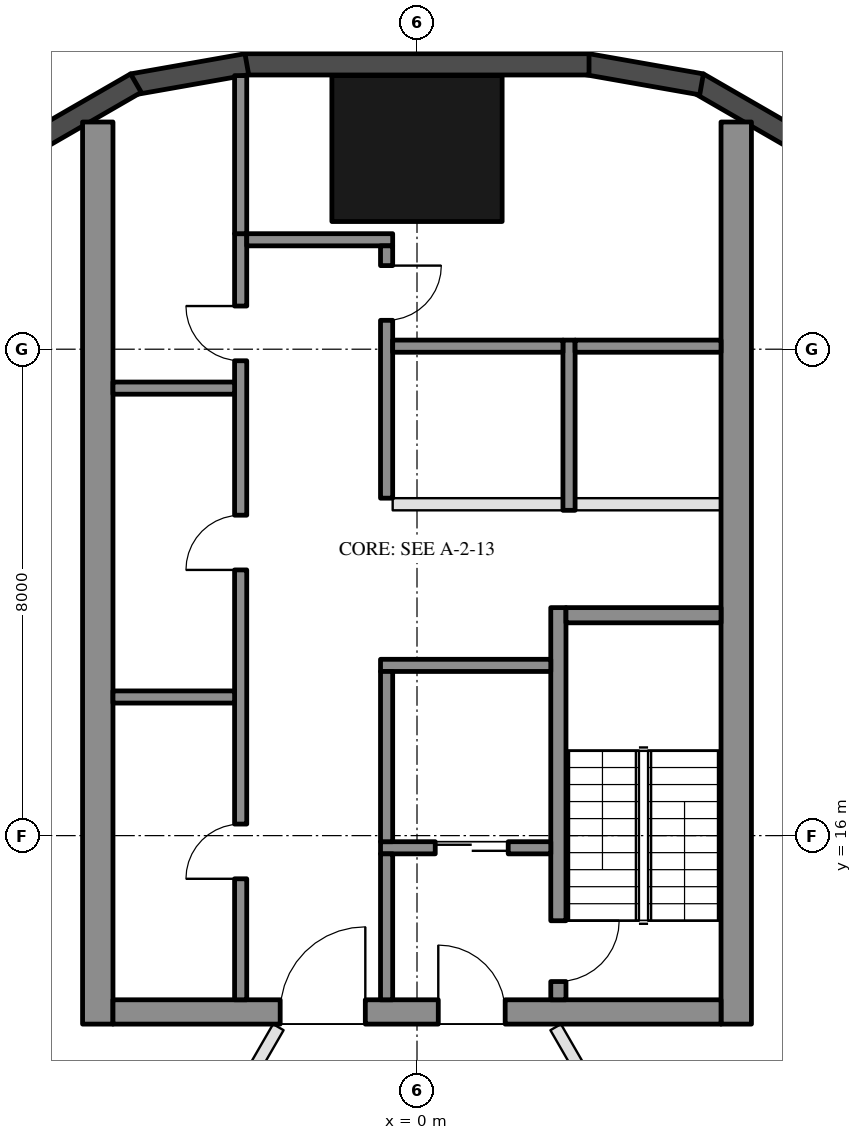
"""IFC4 building model, lengths in metres.
Left out: names, types, materials, properties, quantities, classifications, styles, units other than length and angle.
Written with IfcOpenShell. Run it as: python <this file> out.ifc"""

import sys

from ifc_helpers import new_model, si_unit, direction, frame, frame_2d, origin, origin_2d, place, context, subcontext, project, spatial, rectangle, hollow_rectangle, extrude, element, fill, save


model = new_model("IFC4")
c1 = context("Model", 3, precision=1e-05, world=origin(), true_north=direction((0.0, 1.0)))
c2 = subcontext(c1, "Body", "Model", "MODEL_VIEW")
j1 = project(units=[si_unit("LENGTHUNIT", "METRE"), si_unit("PLANEANGLEUNIT", "RADIAN")], contexts=[c1])
p1 = place(None, origin())
s1 = spatial("IfcSite", under=j1, at=p1, CompositionType="ELEMENT")
p2 = place(p1, origin())
s2 = spatial("IfcBuilding", under=s1, at=p2, CompositionType="ELEMENT")
p3 = place(p2, frame((0.0, 0.0, 61.3)))
s3 = spatial("IfcBuildingStorey", under=s2, at=p3, CompositionType="ELEMENT", Elevation=61.3)
p4 = place(p3, frame((0.0, 27.3, 0.0), z_axis=(0.0, 0.0, 1.0), x_axis=(1.0, 0.0, 0.0)))
e1 = element("IfcColumn", 1, at=p4, inside=s3, PredefinedType="COLUMN", context=c2, shape_type="SweptSolid", body=[
    extrude(hollow_rectangle(XDim=2.8, YDim=2.4, WallThickness=0.07, at=origin_2d()), origin(), (0.0, 0.0, 1.0), 3.7),
])
for number, where, z_axis, x_axis in (
    (2, (6.277, 27.422, 0.0), (0.0, 0.0, 1.0), (-0.866, 0.5, 0.0)),
    (3, (4.68, 28.356, 0.0), (0.0, 0.0, 1.0), (-0.985, 0.174, 0.0)),
):
    element("IfcWall", number, at=place(p3, frame(where, z_axis=z_axis, x_axis=x_axis)), inside=s3, PredefinedType="SOLIDWALL", context=c2, shape_type="SweptSolid", body=[
        extrude(rectangle(XDim=1.91, YDim=0.35, at=frame_2d((0.955, 0.0))), origin(), (0.0, 0.0, 1.0), 3.55),
    ])
p5 = place(p3, frame((2.829, 28.685, 0.0), z_axis=(0.0, 0.0, 1.0), x_axis=(-1.0, 0.0, 0.0)))
e4 = element("IfcWall", 4, at=p5, inside=s3, PredefinedType="SOLIDWALL", context=c2, shape_type="SweptSolid", body=[
    extrude(rectangle(XDim=5.658, YDim=0.35, at=frame_2d((2.829, 0.0))), origin(), (0.0, 0.0, 1.0), 3.55),
])
for number, where, z_axis, x_axis in (
    (5, (-2.799, 28.688, 0.0), (0.0, 0.0, 1.0), (-0.985, -0.174, 0.0)),
    (6, (-4.623, 28.377, 0.0), (0.0, 0.0, 1.0), (-0.866, -0.5, 0.0)),
):
    element("IfcWall", number, at=place(p3, frame(where, z_axis=z_axis, x_axis=x_axis)), inside=s3, PredefinedType="SOLIDWALL", context=c2, shape_type="SweptSolid", body=[
        extrude(rectangle(XDim=1.91, YDim=0.35, at=frame_2d((0.955, 0.0))), origin(), (0.0, 0.0, 1.0), 3.55),
    ])
for number, where, z_axis, x_axis in (
    (7, (5.25, 12.9, 0.0), (0.0, 0.0, 1.0), (0.0, 1.0, 0.0)),
    (8, (-5.25, 12.9, 0.0), (0.0, 0.0, 1.0), (0.0, 1.0, 0.0)),
):
    element("IfcWall", number, at=place(p3, frame(where, z_axis=z_axis, x_axis=x_axis)), inside=s3, PredefinedType="SHEAR", context=c2, shape_type="SweptSolid", body=[
        extrude(rectangle(XDim=14.837, YDim=0.5, at=frame_2d((7.418, 0.0))), origin(), (0.0, 0.0, 1.0), 3.5),
    ])
p6 = place(p3, frame((5.0, 13.1, 0.0), z_axis=(0.0, 0.0, 1.0), x_axis=(-1.0, 0.0, 0.0)))
e9 = element("IfcWall", 9, at=p6, inside=s3, PredefinedType="SHEAR", context=c2, shape_type="SweptSolid", body=[
    extrude(rectangle(XDim=10.0, YDim=0.4, at=frame_2d((5.0, 0.0))), origin(), (0.0, 0.0, 1.0), 3.5),
])
p7 = place(p6, frame((3.55, 0.0, 0.0)))
e10 = element("IfcOpeningElement", 10, at=p7, cuts=e9, PredefinedType="OPENING", context=c2, shape_type="SweptSolid", body=[
    extrude(rectangle(XDim=1.1, YDim=2.1, at=frame_2d((0.55, 1.05))), frame((0.0, 0.21, 0.0), z_axis=(0.0, -1.0, 0.0), x_axis=(1.0, 0.0, 0.0)), (0.0, 0.0, 1.0), 0.42),
])
p8 = place(p6, frame((5.85, 0.0, 0.0)))
e11 = element("IfcOpeningElement", 11, at=p8, cuts=e9, PredefinedType="OPENING", context=c2, shape_type="SweptSolid", body=[
    extrude(rectangle(XDim=1.4, YDim=2.1, at=frame_2d((0.7, 1.05))), frame((0.0, 0.21, 0.0), z_axis=(0.0, -1.0, 0.0), x_axis=(1.0, 0.0, 0.0)), (0.0, 0.0, 1.0), 0.42),
])
p9 = place(p3, frame((2.325, 13.3, 0.0), z_axis=(0.0, 0.0, 1.0), x_axis=(0.0, 1.0, 0.0)))
e12 = element("IfcWall", 12, at=p9, inside=s3, PredefinedType="SHEAR", context=c2, shape_type="SweptSolid", body=[
    extrude(rectangle(XDim=6.45, YDim=0.25, at=frame_2d((3.225, 0.0))), origin(), (0.0, 0.0, 1.0), 3.5),
])
p10 = place(p9, frame((0.3, 0.0, 0.0)))
e13 = element("IfcOpeningElement", 13, at=p10, cuts=e12, PredefinedType="OPENING", context=c2, shape_type="SweptSolid", body=[
    extrude(rectangle(XDim=1.0, YDim=2.1, at=frame_2d((0.5, 1.05))), frame((0.0, 0.135, 0.0), z_axis=(0.0, -1.0, 0.0), x_axis=(1.0, 0.0, 0.0)), (0.0, 0.0, 1.0), 0.27),
])
p11 = place(p3, frame((5.0, 19.625, 0.0), z_axis=(0.0, 0.0, 1.0), x_axis=(-1.0, 0.0, 0.0)))
e14 = element("IfcWall", 14, at=p11, inside=s3, PredefinedType="SHEAR", context=c2, shape_type="SweptSolid", body=[
    extrude(rectangle(XDim=2.55, YDim=0.25, at=frame_2d((1.275, 0.0))), origin(), (0.0, 0.0, 1.0), 3.5),
])
p12 = place(p3, frame((2.2, 18.8, 0.0), z_axis=(0.0, 0.0, 1.0), x_axis=(-1.0, 0.0, 0.0)))
e15 = element("IfcWall", 15, at=p12, inside=s3, PredefinedType="SHEAR", context=c2, shape_type="SweptSolid", body=[
    extrude(rectangle(XDim=2.8, YDim=0.2, at=frame_2d((1.4, 0.0))), origin(), (0.0, 0.0, 1.0), 3.5),
])
p13 = place(p3, frame((2.2, 15.8, 0.0), z_axis=(0.0, 0.0, 1.0), x_axis=(-1.0, 0.0, 0.0)))
e16 = element("IfcWall", 16, at=p13, inside=s3, PredefinedType="SHEAR", context=c2, shape_type="SweptSolid", body=[
    extrude(rectangle(XDim=2.8, YDim=0.2, at=frame_2d((1.4, 0.0))), origin(), (0.0, 0.0, 1.0), 3.5),
])
p14 = place(p13, frame((0.7, 0.0, 0.0)))
e17 = element("IfcOpeningElement", 17, at=p14, cuts=e16, PredefinedType="OPENING", context=c2, shape_type="SweptSolid", body=[
    extrude(rectangle(XDim=1.2, YDim=2.1, at=frame_2d((0.6, 1.05))), frame((0.0, 0.11, 0.0), z_axis=(0.0, -1.0, 0.0), x_axis=(1.0, 0.0, 0.0)), (0.0, 0.0, 1.0), 0.22),
])
p15 = place(p3, frame((-0.5, 15.9, 0.0), z_axis=(0.0, 0.0, 1.0), x_axis=(0.0, 1.0, 0.0)))
e18 = element("IfcWall", 18, at=p15, inside=s3, PredefinedType="SHEAR", context=c2, shape_type="SweptSolid", body=[
    extrude(rectangle(XDim=2.8, YDim=0.2, at=frame_2d((1.4, 0.0))), origin(), (0.0, 0.0, 1.0), 3.5),
])
p16 = place(p3, frame((-0.5, 13.3, 0.0), z_axis=(0.0, 0.0, 1.0), x_axis=(0.0, 1.0, 0.0)))
e19 = element("IfcWall", 19, at=p16, inside=s3, PredefinedType="SHEAR", context=c2, shape_type="SweptSolid", body=[
    extrude(rectangle(XDim=2.4, YDim=0.2, at=frame_2d((1.2, 0.0))), origin(), (0.0, 0.0, 1.0), 3.5),
])
p17 = place(p3, frame((-2.9, 13.3, 0.0), z_axis=(0.0, 0.0, 1.0), x_axis=(0.0, 1.0, 0.0)))
e20 = element("IfcWall", 20, at=p17, inside=s3, PredefinedType="SHEAR", context=c2, shape_type="SweptSolid", body=[
    extrude(rectangle(XDim=12.6, YDim=0.2, at=frame_2d((6.3, 0.0))), origin(), (0.0, 0.0, 1.0), 3.5),
])
p18 = place(p17, frame((1.99, 0.0, 0.0)))
e21 = element("IfcOpeningElement", 21, at=p18, cuts=e20, PredefinedType="OPENING", context=c2, shape_type="SweptSolid", body=[
    extrude(rectangle(XDim=0.9, YDim=2.1, at=frame_2d((0.45, 1.05))), frame((0.0, 0.11, 0.0), z_axis=(0.0, -1.0, 0.0), x_axis=(1.0, 0.0, 0.0)), (0.0, 0.0, 1.0), 0.22),
])
p19 = place(p17, frame((7.07, 0.0, 0.0)))
e22 = element("IfcOpeningElement", 22, at=p19, cuts=e20, PredefinedType="OPENING", context=c2, shape_type="SweptSolid", body=[
    extrude(rectangle(XDim=0.9, YDim=2.1, at=frame_2d((0.45, 1.05))), frame((0.0, 0.11, 0.0), z_axis=(0.0, -1.0, 0.0), x_axis=(1.0, 0.0, 0.0)), (0.0, 0.0, 1.0), 0.22),
])
p20 = place(p17, frame((10.51, 0.0, 0.0)))
e23 = element("IfcOpeningElement", 23, at=p20, cuts=e20, PredefinedType="OPENING", context=c2, shape_type="SweptSolid", body=[
    extrude(rectangle(XDim=0.9, YDim=2.1, at=frame_2d((0.45, 1.05))), frame((0.0, 0.11, 0.0), z_axis=(0.0, -1.0, 0.0), x_axis=(1.0, 0.0, 0.0)), (0.0, 0.0, 1.0), 0.22),
])
p21 = place(p3, frame((-0.4, 25.8, 0.0), z_axis=(0.0, 0.0, 1.0), x_axis=(-1.0, 0.0, 0.0)))
e24 = element("IfcWall", 24, at=p21, inside=s3, PredefinedType="SHEAR", context=c2, shape_type="SweptSolid", body=[
    extrude(rectangle(XDim=2.4, YDim=0.2, at=frame_2d((1.2, 0.0))), origin(), (0.0, 0.0, 1.0), 3.5),
])
p22 = place(p3, frame((-0.5, 21.55, 0.0), z_axis=(0.0, 0.0, 1.0), x_axis=(0.0, 1.0, 0.0)))
e25 = element("IfcWall", 25, at=p22, inside=s3, PredefinedType="SHEAR", context=c2, shape_type="SweptSolid", body=[
    extrude(rectangle(XDim=4.15, YDim=0.2, at=frame_2d((2.075, 0.0))), origin(), (0.0, 0.0, 1.0), 3.5),
])
p23 = place(p22, frame((2.925, 0.0, 0.0)))
e26 = element("IfcOpeningElement", 26, at=p23, cuts=e25, PredefinedType="OPENING", context=c2, shape_type="SweptSolid", body=[
    extrude(rectangle(XDim=0.9, YDim=2.1, at=frame_2d((0.45, 1.05))), frame((0.0, 0.11, 0.0), z_axis=(0.0, -1.0, 0.0), x_axis=(1.0, 0.0, 0.0)), (0.0, 0.0, 1.0), 0.22),
])
for number, where, z_axis, x_axis in (
    (27, (-3.0, 18.28, 0.0), (0.0, 0.0, 1.0), (-1.0, 0.0, 0.0)),
    (28, (-3.0, 23.36, 0.0), (0.0, 0.0, 1.0), (-1.0, 0.0, 0.0)),
):
    element("IfcWall", number, at=place(p3, frame(where, z_axis=z_axis, x_axis=x_axis)), inside=s3, PredefinedType="SHEAR", context=c2, shape_type="SweptSolid", body=[
        extrude(rectangle(XDim=2.0, YDim=0.2, at=frame_2d((1.0, 0.0))), origin(), (0.0, 0.0, 1.0), 3.5),
    ])
p24 = place(p3, frame((-2.9, 25.9, 0.0), z_axis=(0.0, 0.0, 1.0), x_axis=(0.0, 1.0, 0.0)))
e29 = element("IfcWall", 29, at=p24, inside=s3, PredefinedType="SHEAR", context=c2, shape_type="SweptSolid", body=[
    extrude(rectangle(XDim=2.6, YDim=0.2, at=frame_2d((1.3, 0.0))), origin(), (0.0, 0.0, 1.0), 3.5),
])
p25 = place(p3, frame((2.5, 21.35, 0.0), z_axis=(0.0, 0.0, 1.0), x_axis=(0.0, 1.0, 0.0)))
e30 = element("IfcWall", 30, at=p25, inside=s3, PredefinedType="SHEAR", context=c2, shape_type="SweptSolid", body=[
    extrude(rectangle(XDim=2.8, YDim=0.2, at=frame_2d((1.4, 0.0))), origin(), (0.0, 0.0, 1.0), 3.5),
])
p26 = place(p3, frame((5.0, 24.05, 0.0), z_axis=(0.0, 0.0, 1.0), x_axis=(-1.0, 0.0, 0.0)))
e31 = element("IfcWall", 31, at=p26, inside=s3, PredefinedType="SHEAR", context=c2, shape_type="SweptSolid", body=[
    extrude(rectangle(XDim=2.4, YDim=0.2, at=frame_2d((1.2, 0.0))), origin(), (0.0, 0.0, 1.0), 3.5),
])
p27 = place(p3, frame((2.4, 24.05, 0.0), z_axis=(0.0, 0.0, 1.0), x_axis=(-1.0, 0.0, 0.0)))
e32 = element("IfcWall", 32, at=p27, inside=s3, PredefinedType="SHEAR", context=c2, shape_type="SweptSolid", body=[
    extrude(rectangle(XDim=2.8, YDim=0.2, at=frame_2d((1.4, 0.0))), origin(), (0.0, 0.0, 1.0), 3.5),
])
p28 = place(p3, frame((5.0, 21.45, 0.0), z_axis=(0.0, 0.0, 1.0), x_axis=(-1.0, 0.0, 0.0)))
e33 = element("IfcWall", 33, at=p28, inside=s3, PredefinedType="PARTITIONING", context=c2, shape_type="SweptSolid", body=[
    extrude(rectangle(XDim=2.4, YDim=0.2, at=frame_2d((1.2, 0.0))), origin(), (0.0, 0.0, 1.0), 3.5),
])
p29 = place(p3, frame((2.4, 21.45, 0.0), z_axis=(0.0, 0.0, 1.0), x_axis=(-1.0, 0.0, 0.0)))
e34 = element("IfcWall", 34, at=p29, inside=s3, PredefinedType="PARTITIONING", context=c2, shape_type="SweptSolid", body=[
    extrude(rectangle(XDim=2.8, YDim=0.2, at=frame_2d((1.4, 0.0))), origin(), (0.0, 0.0, 1.0), 3.5),
])
p30 = place(p3, frame((2.281, 12.85, 0.0), z_axis=(0.0, 0.0, 1.0), x_axis=(0.499992939664, -0.866029480033, 0.0)))
e35 = element("IfcWall", 35, at=p30, inside=s3, PredefinedType="PARTITIONING", context=c2, shape_type="SweptSolid", body=[
    extrude(rectangle(XDim=7.188, YDim=0.2, at=frame_2d((3.594, 0.0))), origin(), (0.0, 0.0, 1.0), 2.95),
])
p31 = place(p30, frame((3.094, 0.0, 0.0)))
e36 = element("IfcOpeningElement", 36, at=p31, cuts=e35, PredefinedType="OPENING", context=c2, shape_type="SweptSolid", body=[
    extrude(rectangle(XDim=1.0, YDim=2.1, at=frame_2d((0.5, 1.05))), frame((0.0, 0.11, 0.0), z_axis=(0.0, -1.0, 0.0), x_axis=(1.0, 0.0, 0.0)), (0.0, 0.0, 1.0), 0.22),
])
p32 = place(p3, frame((-5.922, 6.542, 0.0), z_axis=(0.0, 0.0, 1.0), x_axis=(0.499989401968, 0.866031522475, 0.0)))
e37 = element("IfcWall", 37, at=p32, inside=s3, PredefinedType="PARTITIONING", context=c2, shape_type="SweptSolid", body=[
    extrude(rectangle(XDim=7.283, YDim=0.2, at=frame_2d((3.642, 0.0))), origin(), (0.0, 0.0, 1.0), 2.95),
])
p33 = place(p32, frame((3.142, 0.0, 0.0)))
e38 = element("IfcOpeningElement", 38, at=p33, cuts=e37, PredefinedType="OPENING", context=c2, shape_type="SweptSolid", body=[
    extrude(rectangle(XDim=1.0, YDim=2.1, at=frame_2d((0.5, 1.05))), frame((0.0, 0.11, 0.0), z_axis=(0.0, -1.0, 0.0), x_axis=(1.0, 0.0, 0.0)), (0.0, 0.0, 1.0), 0.22),
])
p34 = place(p14, origin())
e39 = element("IfcDoor", 39, at=p34, inside=s3, OperationType="DOUBLE_DOOR_SLIDING", PredefinedType="DOOR", context=c2, shape_type="SweptSolid", body=[
    extrude(rectangle(XDim=1.2, YDim=2.1, at=frame_2d((0.6, 1.05))), frame((0.0, 0.025, 0.0), z_axis=(0.0, -1.0, 0.0), x_axis=(1.0, 0.0, 0.0)), (0.0, 0.0, 1.0), 0.05),
])
fill(e17, e39)
p35 = place(p18, origin())
e40 = element("IfcDoor", 40, at=p35, inside=s3, OperationType="SINGLE_SWING_LEFT", PredefinedType="DOOR", context=c2, shape_type="SweptSolid", body=[
    extrude(rectangle(XDim=0.9, YDim=2.1, at=frame_2d((0.45, 1.05))), frame((0.0, 0.025, 0.0), z_axis=(0.0, -1.0, 0.0), x_axis=(1.0, 0.0, 0.0)), (0.0, 0.0, 1.0), 0.05),
])
fill(e21, e40)
p36 = place(p19, origin())
e41 = element("IfcDoor", 41, at=p36, inside=s3, OperationType="SINGLE_SWING_LEFT", PredefinedType="DOOR", context=c2, shape_type="SweptSolid", body=[
    extrude(rectangle(XDim=0.9, YDim=2.1, at=frame_2d((0.45, 1.05))), frame((0.0, 0.025, 0.0), z_axis=(0.0, -1.0, 0.0), x_axis=(1.0, 0.0, 0.0)), (0.0, 0.0, 1.0), 0.05),
])
fill(e22, e41)
p37 = place(p20, origin())
e42 = element("IfcDoor", 42, at=p37, inside=s3, OperationType="SINGLE_SWING_RIGHT", PredefinedType="DOOR", context=c2, shape_type="SweptSolid", body=[
    extrude(rectangle(XDim=0.9, YDim=2.1, at=frame_2d((0.45, 1.05))), frame((0.0, 0.025, 0.0), z_axis=(0.0, -1.0, 0.0), x_axis=(1.0, 0.0, 0.0)), (0.0, 0.0, 1.0), 0.05),
])
fill(e23, e42)
p38 = place(p23, frame((0.9, 0.0, 0.0), z_axis=(0.0, 0.0, 1.0), x_axis=(-1.0, 0.0, 0.0)))
e43 = element("IfcDoor", 43, at=p38, inside=s3, OperationType="SINGLE_SWING_LEFT", PredefinedType="DOOR", context=c2, shape_type="SweptSolid", body=[
    extrude(rectangle(XDim=0.9, YDim=2.1, at=frame_2d((0.45, 1.05))), frame((0.0, 0.025, 0.0), z_axis=(0.0, -1.0, 0.0), x_axis=(1.0, 0.0, 0.0)), (0.0, 0.0, 1.0), 0.05),
])
fill(e26, e43)
p39 = place(p7, frame((1.1, 0.0, 0.0), z_axis=(0.0, 0.0, 1.0), x_axis=(-1.0, 0.0, 0.0)))
e44 = element("IfcDoor", 44, at=p39, inside=s3, OperationType="SINGLE_SWING_LEFT", PredefinedType="DOOR", context=c2, shape_type="SweptSolid", body=[
    extrude(rectangle(XDim=1.1, YDim=2.1, at=frame_2d((0.55, 1.05))), frame((0.0, 0.025, 0.0), z_axis=(0.0, -1.0, 0.0), x_axis=(1.0, 0.0, 0.0)), (0.0, 0.0, 1.0), 0.05),
])
fill(e10, e44)
p40 = place(p8, frame((1.4, 0.0, 0.0), z_axis=(0.0, 0.0, 1.0), x_axis=(-1.0, 0.0, 0.0)))
e45 = element("IfcDoor", 45, at=p40, inside=s3, OperationType="DOUBLE_DOOR_SINGLE_SWING", PredefinedType="DOOR", context=c2, shape_type="SweptSolid", body=[
    extrude(rectangle(XDim=1.4, YDim=2.1, at=frame_2d((0.7, 1.05))), frame((0.0, 0.025, 0.0), z_axis=(0.0, -1.0, 0.0), x_axis=(1.0, 0.0, 0.0)), (0.0, 0.0, 1.0), 0.05),
])
fill(e11, e45)
p41 = place(p10, frame((1.0, 0.0, 0.0), z_axis=(0.0, 0.0, 1.0), x_axis=(-1.0, 0.0, 0.0)))
e46 = element("IfcDoor", 46, at=p41, inside=s3, OperationType="SINGLE_SWING_LEFT", PredefinedType="DOOR", context=c2, shape_type="SweptSolid", body=[
    extrude(rectangle(XDim=1.0, YDim=2.1, at=frame_2d((0.5, 1.05))), frame((0.0, 0.025, 0.0), z_axis=(0.0, -1.0, 0.0), x_axis=(1.0, 0.0, 0.0)), (0.0, 0.0, 1.0), 0.05),
])
fill(e13, e46)
save(model, sys.argv[1])
